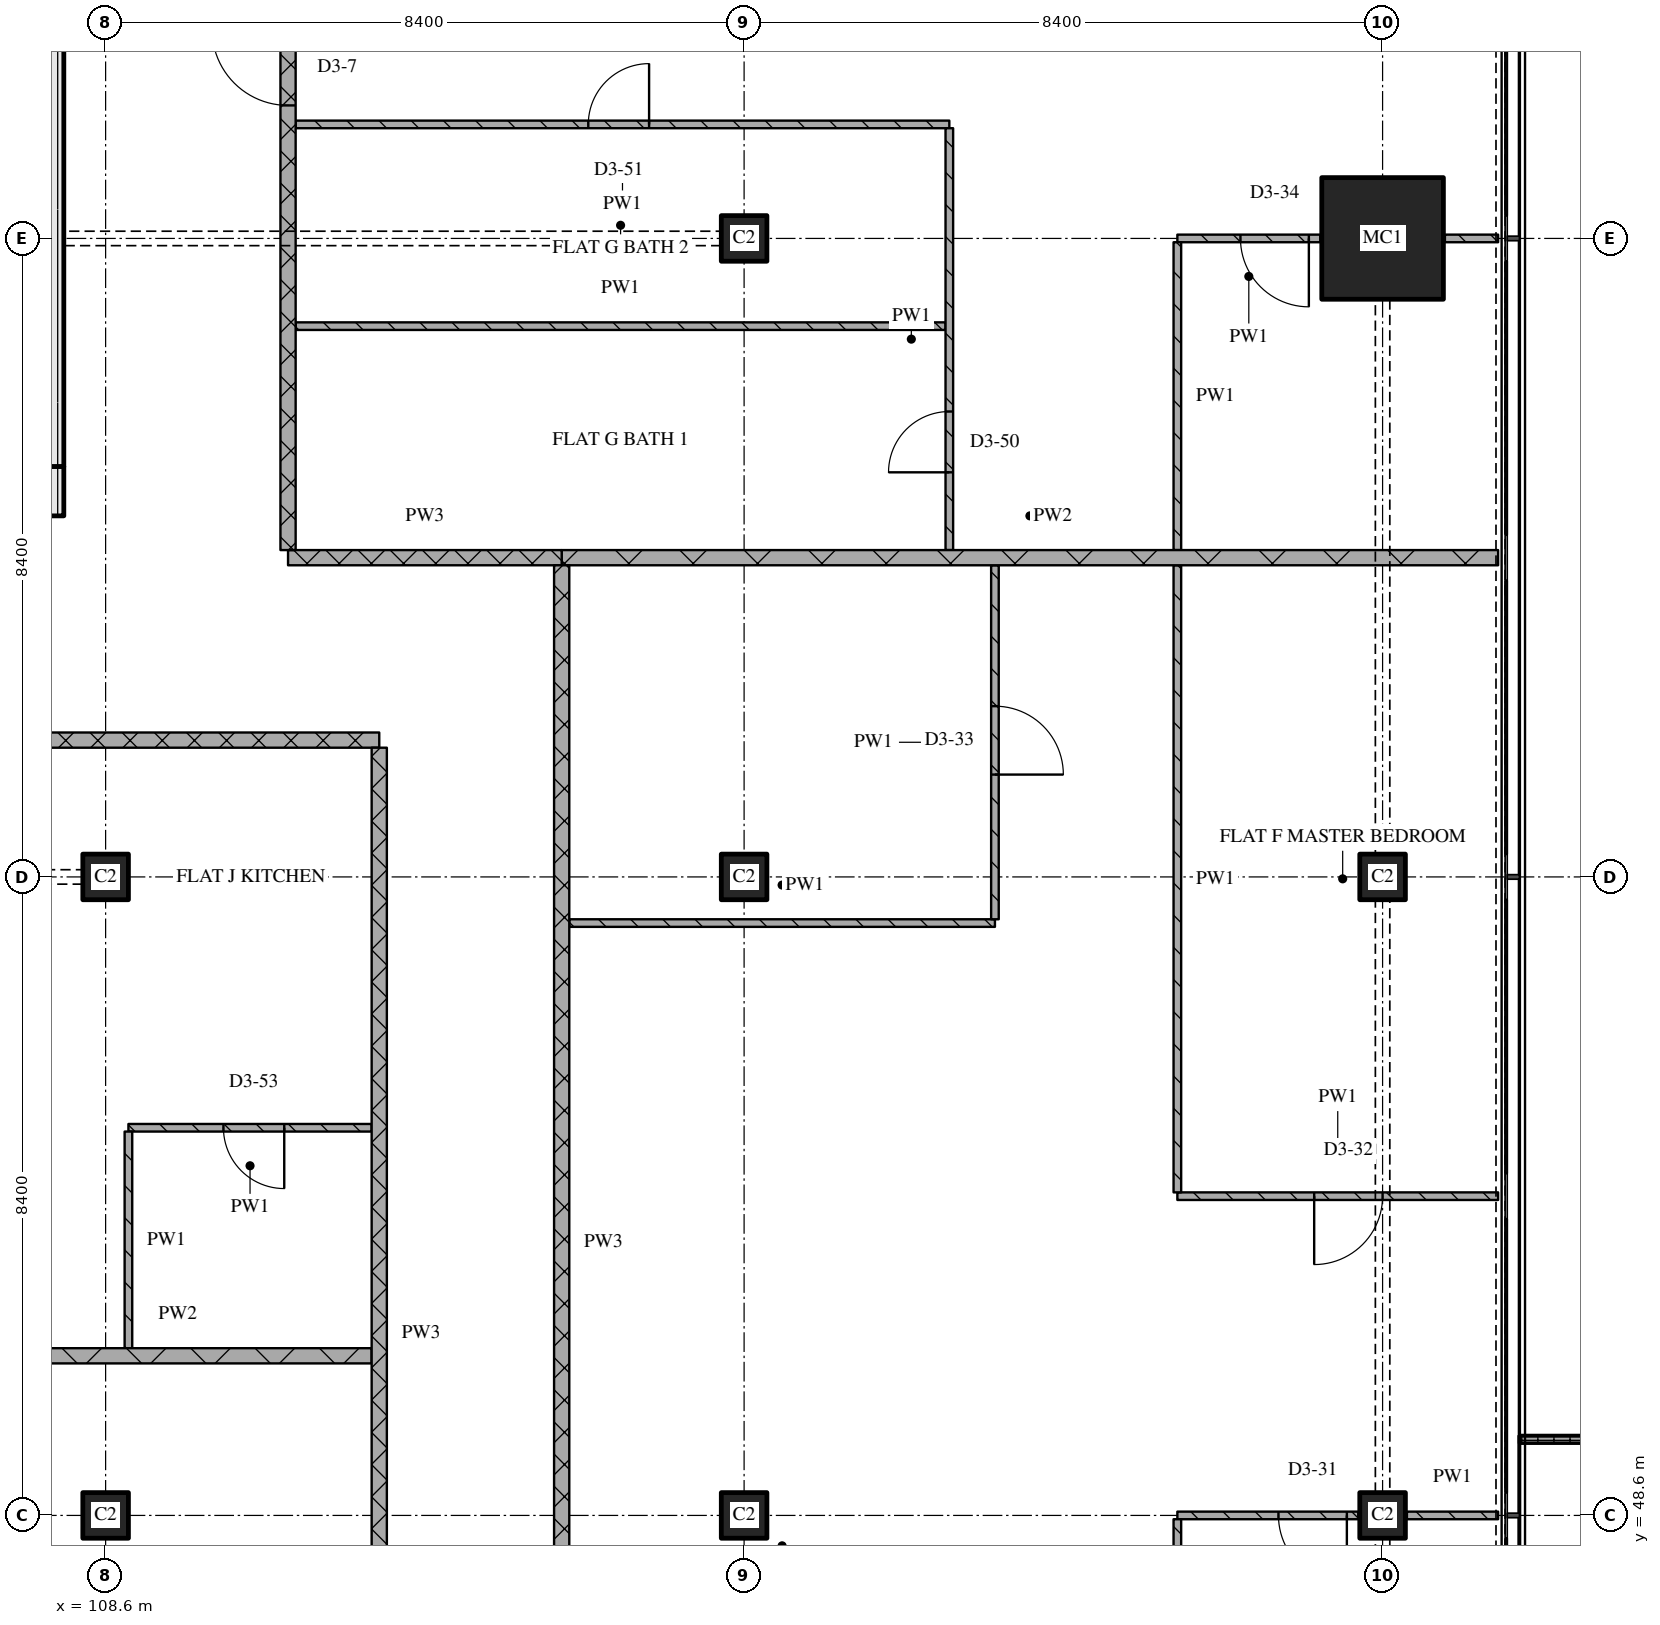
"""IFC4 building model, lengths in metres.
Left out: names, types, materials, properties, quantities, classifications, styles, units other than length and angle.
Written with IfcOpenShell. Run it as: python <this file> out.ifc"""

import sys

from ifc_helpers import new_model, si_unit, direction, frame, frame_2d, origin, origin_2d, place, context, subcontext, project, spatial, polyline, rectangle, outline, extrude, element, fill, save


model = new_model("IFC4")
c1 = context("Model", 3, precision=1e-05, world=origin(), true_north=direction((0.0, 1.0)))
c2 = subcontext(c1, "Body", "Model", "MODEL_VIEW")
j1 = project(units=[si_unit("LENGTHUNIT", "METRE"), si_unit("PLANEANGLEUNIT", "RADIAN")], contexts=[c1])
p1 = place(None, origin())
s1 = spatial("IfcSite", under=j1, at=p1, CompositionType="ELEMENT")
p2 = place(p1, origin())
s2 = spatial("IfcBuilding", under=s1, at=p2, CompositionType="ELEMENT")
p3 = place(p2, frame((0.0, 0.0, 227.1)))
s3 = spatial("IfcBuildingStorey", under=s2, at=p3, CompositionType="ELEMENT", Elevation=227.1)
for number, where, z_axis, x_axis in (
    (1, (108.6, 48.6, 0.0), (0.0, 0.0, 1.0), (1.0, 0.0, 0.0)),
    (2, (108.6, 57.0, 0.0), (0.0, 0.0, 1.0), (1.0, 0.0, 0.0)),
    (3, (117.0, 48.6, 0.0), (0.0, 0.0, 1.0), (1.0, 0.0, 0.0)),
    (4, (117.0, 57.0, 0.0), (0.0, 0.0, 1.0), (1.0, 0.0, 0.0)),
    (5, (117.0, 65.4, 0.0), (0.0, 0.0, 1.0), (1.0, 0.0, 0.0)),
    (6, (125.4, 48.6, 0.0), (0.0, 0.0, 1.0), (1.0, 0.0, 0.0)),
    (7, (125.4, 57.0, 0.0), (0.0, 0.0, 1.0), (1.0, 0.0, 0.0)),
):
    element("IfcColumn", number, at=place(p3, frame(where, z_axis=z_axis, x_axis=x_axis)), inside=s3, PredefinedType="COLUMN", context=c2, shape_type="SweptSolid", body=[
        extrude(rectangle(XDim=0.6, YDim=0.6, at=origin_2d()), origin(), (0.0, 0.0, 1.0), 3.6),
    ])
p4 = place(p3, frame((125.4, 65.4, 0.0), z_axis=(0.0, 0.0, 1.0), x_axis=(1.0, 0.0, 0.0)))
e8 = element("IfcColumn", 8, at=p4, inside=s3, PredefinedType="COLUMN", context=c2, shape_type="SweptSolid", body=[
    extrude(rectangle(XDim=1.6, YDim=1.6, at=origin_2d()), origin(), (0.0, 0.0, 1.0), 3.6),
])
p5 = place(p3, origin())
e9 = element("IfcWall", 9, at=p5, inside=s3, PredefinedType="SOLIDWALL", context=c2, shape_type="SweptSolid", body=[
    extrude(outline(polyline([(127.2, 43.35), (127.2, 43.45), (128.967, 43.45), (128.967, 49.55), (127.2, 49.55), (127.2, 49.65), (129.067, 49.65), (129.067, 43.35), (127.2, 43.35)])), origin(), (0.0, 0.0, 1.0), 1.0),
])
p6 = place(p3, frame((67.15, 62.075, 0.0), z_axis=(0.0, 0.0, 1.0), x_axis=(1.0, 0.0, 0.0)))
e10 = element("IfcWall", 10, at=p6, inside=s3, PredefinedType="SOLIDWALL", context=c2, shape_type="SweptSolid", body=[
    extrude(rectangle(XDim=40.9, YDim=0.65, at=frame_2d((20.45, 0.0))), origin(), (0.0, 0.0, 1.0), 3.32),
])
p7 = place(p6, frame((20.8, 0.0, 0.0)))
e11 = element("IfcOpeningElement", 11, at=p7, cuts=e10, PredefinedType="OPENING", context=c2, shape_type="SweptSolid", body=[
    extrude(rectangle(XDim=1.8, YDim=2.1, at=frame_2d((0.9, 1.05))), frame((0.0, 0.335, 0.0), z_axis=(0.0, -1.0, 0.0), x_axis=(1.0, 0.0, 0.0)), (0.0, 0.0, 1.0), 0.67),
])
p8 = place(p3, frame((107.725, 62.4, 0.0), z_axis=(0.0, 0.0, 1.0), x_axis=(0.0, 1.0, 0.0)))
e12 = element("IfcWall", 12, at=p8, inside=s3, PredefinedType="SOLIDWALL", context=c2, shape_type="SweptSolid", body=[
    extrude(rectangle(XDim=12.0, YDim=0.65, at=frame_2d((6.0, 0.0))), origin(), (0.0, 0.0, 1.0), 3.32),
])
p9 = place(p8, frame((6.45, 0.0, 0.0)))
e13 = element("IfcOpeningElement", 13, at=p9, cuts=e12, PredefinedType="OPENING", context=c2, shape_type="SweptSolid", body=[
    extrude(rectangle(XDim=1.2, YDim=2.1, at=frame_2d((0.6, 1.05))), frame((0.0, 0.335, 0.0), z_axis=(0.0, -1.0, 0.0), x_axis=(1.0, 0.0, 0.0)), (0.0, 0.0, 1.0), 0.67),
])
p10 = place(p3, frame((125.08, 48.6, 0.0), z_axis=(0.0, 0.0, 1.0), x_axis=(-1.0, 0.0, 0.0)))
e14 = element("IfcWall", 14, at=p10, inside=s3, PredefinedType="PARTITIONING", context=c2, shape_type="SweptSolid", body=[
    extrude(rectangle(XDim=2.38, YDim=0.1, at=frame_2d((1.19, 0.0))), origin(), (0.0, 0.0, 1.0), 3.32),
])
p11 = place(p10, frame((0.15, 0.0, 0.0)))
e15 = element("IfcOpeningElement", 15, at=p11, cuts=e14, PredefinedType="OPENING", context=c2, shape_type="SweptSolid", body=[
    extrude(rectangle(XDim=0.9, YDim=2.1, at=frame_2d((0.45, 1.05))), frame((0.0, 0.06, 0.0), z_axis=(0.0, -1.0, 0.0), x_axis=(1.0, 0.0, 0.0)), (0.0, 0.0, 1.0), 0.12),
])
p12 = place(p3, frame((125.72, 48.6, 0.0), z_axis=(0.0, 0.0, 1.0), x_axis=(1.0, 0.0, 0.0)))
e16 = element("IfcWall", 16, at=p12, inside=s3, PredefinedType="PARTITIONING", context=c2, shape_type="SweptSolid", body=[
    extrude(rectangle(XDim=1.2, YDim=0.1, at=frame_2d((0.6, 0.0))), origin(), (0.0, 0.0, 1.0), 3.32),
])
p13 = place(p3, frame((107.0, 50.7, 0.0), z_axis=(0.0, 0.0, 1.0), x_axis=(1.0, 0.0, 0.0)))
e17 = element("IfcWall", 17, at=p13, inside=s3, PredefinedType="PARTITIONING", context=c2, shape_type="SweptSolid", body=[
    extrude(rectangle(XDim=5.1, YDim=0.2, at=frame_2d((2.55, 0.0))), origin(), (0.0, 0.0, 1.0), 3.32),
])
p14 = place(p3, frame((122.7, 52.8, 0.0), z_axis=(0.0, 0.0, 1.0), x_axis=(1.0, 0.0, 0.0)))
e18 = element("IfcWall", 18, at=p14, inside=s3, PredefinedType="PARTITIONING", context=c2, shape_type="SweptSolid", body=[
    extrude(rectangle(XDim=4.22, YDim=0.1, at=frame_2d((2.11, 0.0))), origin(), (0.0, 0.0, 1.0), 3.32),
])
p15 = place(p14, frame((1.8, 0.0, 0.0)))
e19 = element("IfcOpeningElement", 19, at=p15, cuts=e18, PredefinedType="OPENING", context=c2, shape_type="SweptSolid", body=[
    extrude(rectangle(XDim=0.9, YDim=2.1, at=frame_2d((0.45, 1.05))), frame((0.0, 0.06, 0.0), z_axis=(0.0, -1.0, 0.0), x_axis=(1.0, 0.0, 0.0)), (0.0, 0.0, 1.0), 0.12),
])
p16 = place(p3, frame((112.1, 53.7, 0.0), z_axis=(0.0, 0.0, 1.0), x_axis=(-1.0, 0.0, 0.0)))
e20 = element("IfcWall", 20, at=p16, inside=s3, PredefinedType="PARTITIONING", context=c2, shape_type="SweptSolid", body=[
    extrude(rectangle(XDim=3.2, YDim=0.1, at=frame_2d((1.6, 0.0))), origin(), (0.0, 0.0, 1.0), 3.32),
])
p17 = place(p16, frame((1.15, 0.0, 0.0)))
e21 = element("IfcOpeningElement", 21, at=p17, cuts=e20, PredefinedType="OPENING", context=c2, shape_type="SweptSolid", body=[
    extrude(rectangle(XDim=0.8, YDim=2.1, at=frame_2d((0.4, 1.05))), frame((0.0, 0.06, 0.0), z_axis=(0.0, -1.0, 0.0), x_axis=(1.0, 0.0, 0.0)), (0.0, 0.0, 1.0), 0.12),
])
p18 = place(p3, frame((114.7, 56.393, 0.0), z_axis=(0.0, 0.0, 1.0), x_axis=(1.0, 0.0, 0.0)))
e22 = element("IfcWall", 22, at=p18, inside=s3, PredefinedType="PARTITIONING", context=c2, shape_type="SweptSolid", body=[
    extrude(rectangle(XDim=5.6, YDim=0.1, at=frame_2d((2.8, 0.0))), origin(), (0.0, 0.0, 1.0), 3.32),
])
p19 = place(p3, frame((112.2, 58.8, 0.0), z_axis=(0.0, 0.0, 1.0), x_axis=(-1.0, 0.0, 0.0)))
e23 = element("IfcWall", 23, at=p19, inside=s3, PredefinedType="PARTITIONING", context=c2, shape_type="SweptSolid", body=[
    extrude(rectangle(XDim=10.8, YDim=0.2, at=frame_2d((5.4, 0.0))), origin(), (0.0, 0.0, 1.0), 3.32),
])
p20 = place(p19, frame((6.45, 0.0, 0.0)))
e24 = element("IfcOpeningElement", 24, at=p20, cuts=e23, PredefinedType="OPENING", context=c2, shape_type="SweptSolid", body=[
    extrude(rectangle(XDim=1.0, YDim=2.1, at=frame_2d((0.5, 1.05))), frame((0.0, 0.11, 0.0), z_axis=(0.0, -1.0, 0.0), x_axis=(1.0, 0.0, 0.0)), (0.0, 0.0, 1.0), 0.22),
])
p21 = place(p3, frame((111.0, 61.2, 0.0), z_axis=(0.0, 0.0, 1.0), x_axis=(1.0, 0.0, 0.0)))
e25 = element("IfcWall", 25, at=p21, inside=s3, PredefinedType="PARTITIONING", context=c2, shape_type="SweptSolid", body=[
    extrude(rectangle(XDim=3.6, YDim=0.2, at=frame_2d((1.8, 0.0))), origin(), (0.0, 0.0, 1.0), 3.32),
])
p22 = place(p3, frame((114.6, 61.2, 0.0), z_axis=(0.0, 0.0, 1.0), x_axis=(1.0, 0.0, 0.0)))
e26 = element("IfcWall", 26, at=p22, inside=s3, PredefinedType="PARTITIONING", context=c2, shape_type="SweptSolid", body=[
    extrude(rectangle(XDim=12.32, YDim=0.2, at=frame_2d((6.16, 0.0))), origin(), (0.0, 0.0, 1.0), 3.32),
])
p23 = place(p3, frame((111.1, 64.246, 0.0), z_axis=(0.0, 0.0, 1.0), x_axis=(1.0, 0.0, 0.0)))
e27 = element("IfcWall", 27, at=p23, inside=s3, PredefinedType="PARTITIONING", context=c2, shape_type="SweptSolid", body=[
    extrude(rectangle(XDim=8.55, YDim=0.1, at=frame_2d((4.275, 0.0))), origin(), (0.0, 0.0, 1.0), 3.32),
])
p24 = place(p3, frame((124.58, 65.4, 0.0), z_axis=(0.0, 0.0, 1.0), x_axis=(-1.0, 0.0, 0.0)))
e28 = element("IfcWall", 28, at=p24, inside=s3, PredefinedType="PARTITIONING", context=c2, shape_type="SweptSolid", body=[
    extrude(rectangle(XDim=1.88, YDim=0.1, at=frame_2d((0.94, 0.0))), origin(), (0.0, 0.0, 1.0), 3.32),
])
p25 = place(p24, frame((0.15, 0.0, 0.0)))
e29 = element("IfcOpeningElement", 29, at=p25, cuts=e28, PredefinedType="OPENING", context=c2, shape_type="SweptSolid", body=[
    extrude(rectangle(XDim=0.9, YDim=2.1, at=frame_2d((0.45, 1.05))), frame((0.0, 0.06, 0.0), z_axis=(0.0, -1.0, 0.0), x_axis=(1.0, 0.0, 0.0)), (0.0, 0.0, 1.0), 0.12),
])
p26 = place(p3, frame((126.22, 65.4, 0.0), z_axis=(0.0, 0.0, 1.0), x_axis=(1.0, 0.0, 0.0)))
e30 = element("IfcWall", 30, at=p26, inside=s3, PredefinedType="PARTITIONING", context=c2, shape_type="SweptSolid", body=[
    extrude(rectangle(XDim=0.7, YDim=0.1, at=frame_2d((0.35, 0.0))), origin(), (0.0, 0.0, 1.0), 3.32),
])
p27 = place(p3, frame((119.7, 66.9, 0.0), z_axis=(0.0, 0.0, 1.0), x_axis=(-1.0, 0.0, 0.0)))
e31 = element("IfcWall", 31, at=p27, inside=s3, PredefinedType="PARTITIONING", context=c2, shape_type="SweptSolid", body=[
    extrude(rectangle(XDim=8.6, YDim=0.1, at=frame_2d((4.3, 0.0))), origin(), (0.0, 0.0, 1.0), 3.32),
])
p28 = place(p27, frame((3.95, 0.0, 0.0)))
e32 = element("IfcOpeningElement", 32, at=p28, cuts=e31, PredefinedType="OPENING", context=c2, shape_type="SweptSolid", body=[
    extrude(rectangle(XDim=0.8, YDim=2.1, at=frame_2d((0.4, 1.05))), frame((0.0, 0.06, 0.0), z_axis=(0.0, -1.0, 0.0), x_axis=(1.0, 0.0, 0.0)), (0.0, 0.0, 1.0), 0.12),
])
p29 = place(p3, frame((108.9, 53.65, 0.0), z_axis=(0.0, 0.0, 1.0), x_axis=(0.0, -1.0, 0.0)))
e33 = element("IfcWall", 33, at=p29, inside=s3, PredefinedType="PARTITIONING", context=c2, shape_type="SweptSolid", body=[
    extrude(rectangle(XDim=2.85, YDim=0.1, at=frame_2d((1.425, 0.0))), origin(), (0.0, 0.0, 1.0), 3.32),
])
p30 = place(p3, frame((111.0, 75.32, 0.0), z_axis=(0.0, 0.0, 1.0), x_axis=(0.0, -1.0, 0.0)))
e34 = element("IfcWall", 34, at=p30, inside=s3, PredefinedType="PARTITIONING", context=c2, shape_type="SweptSolid", body=[
    extrude(rectangle(XDim=14.02, YDim=0.2, at=frame_2d((7.01, 0.0))), origin(), (0.0, 0.0, 1.0), 3.32),
])
p31 = place(p30, frame((7.17, 0.0, 0.0)))
e35 = element("IfcOpeningElement", 35, at=p31, cuts=e34, PredefinedType="OPENING", context=c2, shape_type="SweptSolid", body=[
    extrude(rectangle(XDim=1.0, YDim=2.1, at=frame_2d((0.5, 1.05))), frame((0.0, 0.11, 0.0), z_axis=(0.0, -1.0, 0.0), x_axis=(1.0, 0.0, 0.0)), (0.0, 0.0, 1.0), 0.22),
])
p32 = place(p3, frame((112.2, 58.7, 0.0), z_axis=(0.0, 0.0, 1.0), x_axis=(0.0, -1.0, 0.0)))
e36 = element("IfcWall", 36, at=p32, inside=s3, PredefinedType="PARTITIONING", context=c2, shape_type="SweptSolid", body=[
    extrude(rectangle(XDim=15.4, YDim=0.2, at=frame_2d((7.7, 0.0))), origin(), (0.0, 0.0, 1.0), 3.32),
])
p33 = place(p3, frame((114.6, 61.1, 0.0), z_axis=(0.0, 0.0, 1.0), x_axis=(0.0, -1.0, 0.0)))
e37 = element("IfcWall", 37, at=p33, inside=s3, PredefinedType="PARTITIONING", context=c2, shape_type="SweptSolid", body=[
    extrude(rectangle(XDim=17.8, YDim=0.2, at=frame_2d((8.9, 0.0))), origin(), (0.0, 0.0, 1.0), 3.32),
])
p34 = place(p3, frame((119.7, 61.3, 0.0), z_axis=(0.0, 0.0, 1.0), x_axis=(0.0, 1.0, 0.0)))
e38 = element("IfcWall", 38, at=p34, inside=s3, PredefinedType="PARTITIONING", context=c2, shape_type="SweptSolid", body=[
    extrude(rectangle(XDim=5.55, YDim=0.1, at=frame_2d((2.775, 0.0))), origin(), (0.0, 0.0, 1.0), 3.32),
])
p35 = place(p34, frame((1.023, 0.0, 0.0)))
e39 = element("IfcOpeningElement", 39, at=p35, cuts=e38, PredefinedType="OPENING", context=c2, shape_type="SweptSolid", body=[
    extrude(rectangle(XDim=0.8, YDim=2.1, at=frame_2d((0.4, 1.05))), frame((0.0, 0.06, 0.0), z_axis=(0.0, -1.0, 0.0), x_axis=(1.0, 0.0, 0.0)), (0.0, 0.0, 1.0), 0.12),
])
p36 = place(p3, frame((120.3, 56.443, 0.0), z_axis=(0.0, 0.0, 1.0), x_axis=(0.0, 1.0, 0.0)))
e40 = element("IfcWall", 40, at=p36, inside=s3, PredefinedType="PARTITIONING", context=c2, shape_type="SweptSolid", body=[
    extrude(rectangle(XDim=4.657, YDim=0.1, at=frame_2d((2.329, 0.0))), origin(), (0.0, 0.0, 1.0), 3.32),
])
p37 = place(p36, frame((1.904, 0.0, 0.0)))
e41 = element("IfcOpeningElement", 41, at=p37, cuts=e40, PredefinedType="OPENING", context=c2, shape_type="SweptSolid", body=[
    extrude(rectangle(XDim=0.9, YDim=2.1, at=frame_2d((0.45, 1.05))), frame((0.0, 0.06, 0.0), z_axis=(0.0, -1.0, 0.0), x_axis=(1.0, 0.0, 0.0)), (0.0, 0.0, 1.0), 0.12),
])
p38 = place(p3, frame((122.7, 48.55, 0.0), z_axis=(0.0, 0.0, 1.0), x_axis=(0.0, -1.0, 0.0)))
e42 = element("IfcWall", 42, at=p38, inside=s3, PredefinedType="PARTITIONING", context=c2, shape_type="SweptSolid", body=[
    extrude(rectangle(XDim=5.25, YDim=0.1, at=frame_2d((2.625, 0.0))), origin(), (0.0, 0.0, 1.0), 3.32),
])
p39 = place(p3, frame((122.7, 61.1, 0.0), z_axis=(0.0, 0.0, 1.0), x_axis=(0.0, -1.0, 0.0)))
e43 = element("IfcWall", 43, at=p39, inside=s3, PredefinedType="PARTITIONING", context=c2, shape_type="SweptSolid", body=[
    extrude(rectangle(XDim=8.25, YDim=0.1, at=frame_2d((4.125, 0.0))), origin(), (0.0, 0.0, 1.0), 3.32),
])
p40 = place(p3, frame((122.7, 65.35, 0.0), z_axis=(0.0, 0.0, 1.0), x_axis=(0.0, -1.0, 0.0)))
e44 = element("IfcWall", 44, at=p40, inside=s3, PredefinedType="PARTITIONING", context=c2, shape_type="SweptSolid", body=[
    extrude(rectangle(XDim=4.05, YDim=0.1, at=frame_2d((2.025, 0.0))), origin(), (0.0, 0.0, 1.0), 3.32),
])
p41 = place(p11, origin())
e45 = element("IfcDoor", 45, at=p41, inside=s3, OperationType="SINGLE_SWING_LEFT", PredefinedType="DOOR", context=c2, shape_type="SweptSolid", body=[
    extrude(rectangle(XDim=0.9, YDim=2.1, at=frame_2d((0.45, 1.05))), frame((0.0, 0.025, 0.0), z_axis=(0.0, -1.0, 0.0), x_axis=(1.0, 0.0, 0.0)), (0.0, 0.0, 1.0), 0.05),
])
fill(e15, e45)
p42 = place(p15, origin())
e46 = element("IfcDoor", 46, at=p42, inside=s3, OperationType="SINGLE_SWING_RIGHT", PredefinedType="DOOR", context=c2, shape_type="SweptSolid", body=[
    extrude(rectangle(XDim=0.9, YDim=2.1, at=frame_2d((0.45, 1.05))), frame((0.0, 0.025, 0.0), z_axis=(0.0, -1.0, 0.0), x_axis=(1.0, 0.0, 0.0)), (0.0, 0.0, 1.0), 0.05),
])
fill(e19, e46)
p43 = place(p17, origin())
e47 = element("IfcDoor", 47, at=p43, inside=s3, OperationType="SINGLE_SWING_LEFT", PredefinedType="DOOR", context=c2, shape_type="SweptSolid", body=[
    extrude(rectangle(XDim=0.8, YDim=2.1, at=frame_2d((0.4, 1.05))), frame((0.0, 0.025, 0.0), z_axis=(0.0, -1.0, 0.0), x_axis=(1.0, 0.0, 0.0)), (0.0, 0.0, 1.0), 0.05),
])
fill(e21, e47)
p44 = place(p25, origin())
e48 = element("IfcDoor", 48, at=p44, inside=s3, OperationType="SINGLE_SWING_LEFT", PredefinedType="DOOR", context=c2, shape_type="SweptSolid", body=[
    extrude(rectangle(XDim=0.9, YDim=2.1, at=frame_2d((0.45, 1.05))), frame((0.0, 0.025, 0.0), z_axis=(0.0, -1.0, 0.0), x_axis=(1.0, 0.0, 0.0)), (0.0, 0.0, 1.0), 0.05),
])
fill(e29, e48)
p45 = place(p28, origin())
e49 = element("IfcDoor", 49, at=p45, inside=s3, OperationType="SINGLE_SWING_RIGHT", PredefinedType="DOOR", context=c2, shape_type="SweptSolid", body=[
    extrude(rectangle(XDim=0.8, YDim=2.1, at=frame_2d((0.4, 1.05))), frame((0.0, 0.025, 0.0), z_axis=(0.0, -1.0, 0.0), x_axis=(1.0, 0.0, 0.0)), (0.0, 0.0, 1.0), 0.05),
])
fill(e32, e49)
p46 = place(p31, origin())
e50 = element("IfcDoor", 50, at=p46, inside=s3, OperationType="SINGLE_SWING_RIGHT", PredefinedType="DOOR", context=c2, shape_type="SweptSolid", body=[
    extrude(rectangle(XDim=1.0, YDim=2.1, at=frame_2d((0.5, 1.05))), frame((0.0, 0.025, 0.0), z_axis=(0.0, -1.0, 0.0), x_axis=(1.0, 0.0, 0.0)), (0.0, 0.0, 1.0), 0.05),
])
fill(e35, e50)
p47 = place(p35, origin())
e51 = element("IfcDoor", 51, at=p47, inside=s3, OperationType="SINGLE_SWING_LEFT", PredefinedType="DOOR", context=c2, shape_type="SweptSolid", body=[
    extrude(rectangle(XDim=0.8, YDim=2.1, at=frame_2d((0.4, 1.05))), frame((0.0, 0.025, 0.0), z_axis=(0.0, -1.0, 0.0), x_axis=(1.0, 0.0, 0.0)), (0.0, 0.0, 1.0), 0.05),
])
fill(e39, e51)
p48 = place(p37, origin())
e52 = element("IfcDoor", 52, at=p48, inside=s3, OperationType="SINGLE_SWING_RIGHT", PredefinedType="DOOR", context=c2, shape_type="SweptSolid", body=[
    extrude(rectangle(XDim=0.9, YDim=2.1, at=frame_2d((0.45, 1.05))), frame((0.0, 0.025, 0.0), z_axis=(0.0, -1.0, 0.0), x_axis=(1.0, 0.0, 0.0)), (0.0, 0.0, 1.0), 0.05),
])
fill(e41, e52)
save(model, sys.argv[1])
